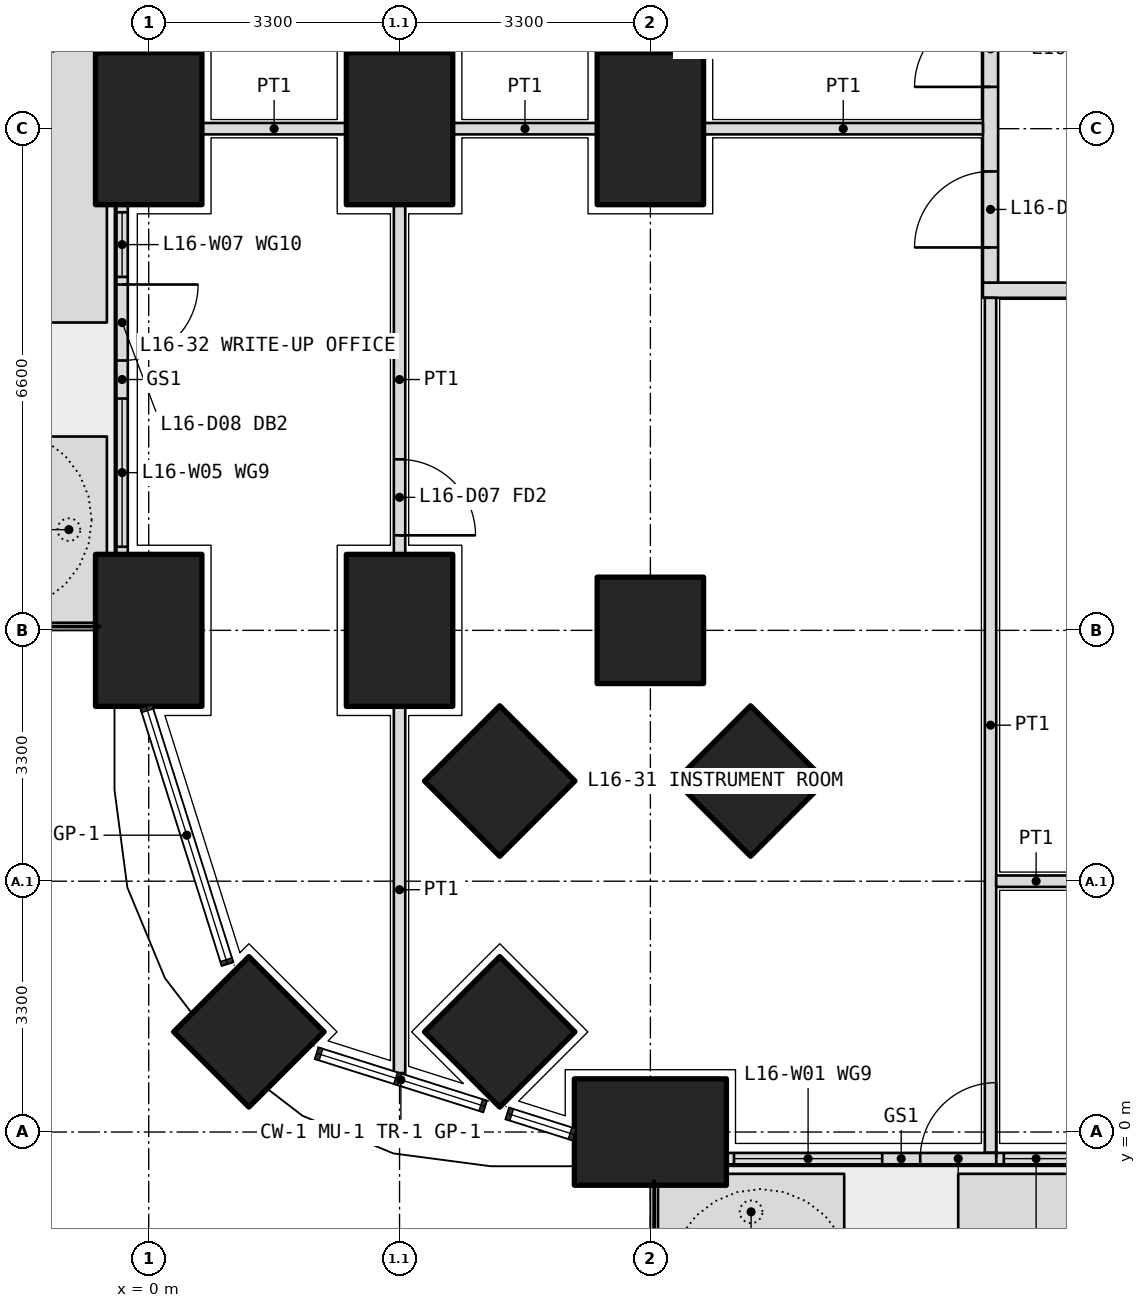
"""IFC4 building model, lengths in metres.
Left out: names, types, materials, properties, quantities, classifications, styles, units other than length and angle.
Written with IfcOpenShell. Run it as: python <this file> out.ifc"""

import sys

from ifc_helpers import new_model, si_unit, direction, frame, frame_2d, origin, origin_2d, place, context, subcontext, project, spatial, polyline, rectangle, outline, extrude, element, fill, save


model = new_model("IFC4")
c1 = context("Model", 3, precision=1e-05, world=origin(), true_north=direction((0.0, 1.0)))
c2 = subcontext(c1, "Body", "Model", "MODEL_VIEW")
j1 = project(units=[si_unit("LENGTHUNIT", "METRE"), si_unit("PLANEANGLEUNIT", "RADIAN")], contexts=[c1])
p1 = place(None, origin())
s1 = spatial("IfcSite", under=j1, at=p1, CompositionType="ELEMENT")
p2 = place(p1, origin())
s2 = spatial("IfcBuilding", under=s1, at=p2, CompositionType="ELEMENT")
p3 = place(p2, frame((0.0, 0.0, 71.7)))
s3 = spatial("IfcBuildingStorey", under=s2, at=p3, CompositionType="ELEMENT", Elevation=71.7)
p4 = place(p3, frame((1.318, 1.318, 0.0), z_axis=(0.0, 0.0, 1.0), x_axis=(0.707106781187, 0.707106781187, 0.0)))
e1 = element("IfcColumn", 1, at=p4, inside=s3, PredefinedType="COLUMN", context=c2, shape_type="SweptSolid", body=[
    extrude(rectangle(XDim=1.4, YDim=1.4, at=origin_2d()), origin(), (0.0, 0.0, 1.0), 4.2),
])
for number, where, z_axis, x_axis in (
    (2, (6.6, 0.0, 0.0), (0.0, 0.0, 1.0), (1.0, 0.0, 0.0)),
    (3, (0.0, 6.6, 0.0), (0.0, 0.0, 1.0), (0.0, 1.0, 0.0)),
    (4, (0.0, 13.2, 0.0), (0.0, 0.0, 1.0), (0.0, 1.0, 0.0)),
):
    element("IfcColumn", number, at=place(p3, frame(where, z_axis=z_axis, x_axis=x_axis)), inside=s3, PredefinedType="COLUMN", context=c2, shape_type="SweptSolid", body=[
        extrude(rectangle(XDim=2.0, YDim=1.4, at=origin_2d()), origin(), (0.0, 0.0, 1.0), 4.2),
    ])
for number, where, z_axis, x_axis in (
    (5, (6.6, 6.6, 0.0), (0.0, 0.0, 1.0), (1.0, 0.0, 0.0)),
    (6, (4.618, 1.318, 0.0), (0.0, 0.0, 1.0), (0.707, 0.707, 0.0)),
):
    element("IfcColumn", number, at=place(p3, frame(where, z_axis=z_axis, x_axis=x_axis)), inside=s3, PredefinedType="COLUMN", context=c2, shape_type="SweptSolid", body=[
        extrude(rectangle(XDim=1.4, YDim=1.4, at=origin_2d()), origin(), (0.0, 0.0, 1.0), 4.2),
    ])
for number, where, z_axis, x_axis in (
    (7, (3.3, 6.6, 0.0), (0.0, 0.0, 1.0), (0.0, 1.0, 0.0)),
    (8, (3.3, 13.2, 0.0), (0.0, 0.0, 1.0), (0.0, 1.0, 0.0)),
):
    element("IfcColumn", number, at=place(p3, frame(where, z_axis=z_axis, x_axis=x_axis)), inside=s3, PredefinedType="COLUMN", context=c2, shape_type="SweptSolid", body=[
        extrude(rectangle(XDim=2.0, YDim=1.4, at=origin_2d()), origin(), (0.0, 0.0, 1.0), 4.2),
    ])
for number, where, z_axis, x_axis in (
    (9, (4.618, 4.618, 0.0), (0.0, 0.0, 1.0), (0.707, 0.707, 0.0)),
    (10, (7.918, 4.618, 0.0), (0.0, 0.0, 1.0), (0.707, 0.707, 0.0)),
):
    element("IfcColumn", number, at=place(p3, frame(where, z_axis=z_axis, x_axis=x_axis)), inside=s3, PredefinedType="COLUMN", context=c2, shape_type="SweptSolid", body=[
        extrude(rectangle(XDim=1.4, YDim=1.4, at=origin_2d()), origin(), (0.0, 0.0, 1.0), 4.2),
    ])
p5 = place(p3, frame((6.6, 13.2, 0.0), z_axis=(0.0, 0.0, 1.0), x_axis=(0.0, 1.0, 0.0)))
e11 = element("IfcColumn", 11, at=p5, inside=s3, PredefinedType="COLUMN", context=c2, shape_type="SweptSolid", body=[
    extrude(rectangle(XDim=2.0, YDim=1.4, at=origin_2d()), origin(), (0.0, 0.0, 1.0), 4.2),
])
p6 = place(p3, origin())
e12 = element("IfcWall", 12, at=p6, inside=s3, PredefinedType="USERDEFINED", context=c2, shape_type="SweptSolid", body=[
    extrude(outline(polyline([(6.7, -1.55), (9.15, -1.55), (9.15, -0.55), (6.7, -0.55), (6.7, -1.55)]), holes=[polyline([(6.85, -1.4), (9.0, -1.4), (9.0, -0.7), (6.85, -0.7), (6.85, -1.4)])]), origin(), (0.0, 0.0, 1.0), 1.05),
])
p7 = place(p3, origin())
e13 = element("IfcWall", 13, at=p7, inside=s3, PredefinedType="USERDEFINED", context=c2, shape_type="SweptSolid", body=[
    extrude(outline(polyline([(10.65, -1.55), (19.7, -1.55), (19.7, -0.55), (10.65, -0.55), (10.65, -1.55)]), holes=[polyline([(10.8, -1.4), (19.55, -1.4), (19.55, -0.7), (10.8, -0.7), (10.8, -1.4)])]), origin(), (0.0, 0.0, 1.0), 1.05),
])
p8 = place(p3, origin())
e14 = element("IfcWall", 14, at=p8, inside=s3, PredefinedType="USERDEFINED", context=c2, shape_type="SweptSolid", body=[
    extrude(outline(polyline([(-1.55, 6.7), (-0.55, 6.7), (-0.55, 9.15), (-1.55, 9.15), (-1.55, 6.7)]), holes=[polyline([(-1.4, 6.85), (-0.7, 6.85), (-0.7, 9.0), (-1.4, 9.0), (-1.4, 6.85)])]), origin(), (0.0, 0.0, 1.0), 1.05),
])
p9 = place(p3, origin())
e15 = element("IfcWall", 15, at=p9, inside=s3, PredefinedType="USERDEFINED", context=c2, shape_type="SweptSolid", body=[
    extrude(outline(polyline([(-1.55, 10.65), (-0.55, 10.65), (-0.55, 19.7), (-1.55, 19.7), (-1.55, 10.65)]), holes=[polyline([(-1.4, 10.8), (-0.7, 10.8), (-0.7, 19.55), (-1.4, 19.55), (-1.4, 10.8)])]), origin(), (0.0, 0.0, 1.0), 1.05),
])
p10 = place(p3, frame((7.6, -0.35, 0.0), z_axis=(0.0, 0.0, 1.0), x_axis=(1.0, 0.0, 0.0)))
e16 = element("IfcWall", 16, at=p10, inside=s3, PredefinedType="SOLIDWALL", context=c2, shape_type="SweptSolid", body=[
    extrude(rectangle(XDim=4.6, YDim=0.15, at=frame_2d((2.3, 0.0))), origin(), (0.0, 0.0, 1.0), 2.05),
])
p11 = place(p10, frame((2.55, 0.0, 0.0)))
e17 = element("IfcOpeningElement", 17, at=p11, cuts=e16, PredefinedType="OPENING", context=c2, shape_type="SweptSolid", body=[
    extrude(rectangle(XDim=1.0, YDim=2.0, at=frame_2d((0.5, 1.0))), frame((0.0, 0.085, 0.0), z_axis=(0.0, -1.0, 0.0), x_axis=(1.0, 0.0, 0.0)), (0.0, 0.0, 1.0), 0.17),
])
p12 = place(p10, frame((0.1, 0.0, 0.1)))
e18 = element("IfcOpeningElement", 18, at=p12, cuts=e16, PredefinedType="OPENING", context=c2, shape_type="SweptSolid", body=[
    extrude(rectangle(XDim=1.95, YDim=1.65, at=frame_2d((0.975, 0.825))), frame((0.0, 0.085, 0.0), z_axis=(0.0, -1.0, 0.0), x_axis=(1.0, 0.0, 0.0)), (0.0, 0.0, 1.0), 0.17),
])
p13 = place(p10, frame((3.65, 0.0, 0.1)))
e19 = element("IfcOpeningElement", 19, at=p13, cuts=e16, PredefinedType="OPENING", context=c2, shape_type="SweptSolid", body=[
    extrude(rectangle(XDim=0.85, YDim=1.65, at=frame_2d((0.425, 0.825))), frame((0.0, 0.085, 0.0), z_axis=(0.0, -1.0, 0.0), x_axis=(1.0, 0.0, 0.0)), (0.0, 0.0, 1.0), 0.17),
])
p14 = place(p3, frame((-0.35, 12.2, 0.0), z_axis=(0.0, 0.0, 1.0), x_axis=(0.0, -1.0, 0.0)))
e20 = element("IfcWall", 20, at=p14, inside=s3, PredefinedType="SOLIDWALL", context=c2, shape_type="SweptSolid", body=[
    extrude(rectangle(XDim=4.6, YDim=0.15, at=frame_2d((2.3, 0.0))), origin(), (0.0, 0.0, 1.0), 2.05),
])
p15 = place(p14, frame((1.05, 0.0, 0.0)))
e21 = element("IfcOpeningElement", 21, at=p15, cuts=e20, PredefinedType="OPENING", context=c2, shape_type="SweptSolid", body=[
    extrude(rectangle(XDim=1.0, YDim=2.0, at=frame_2d((0.5, 1.0))), frame((0.0, 0.085, 0.0), z_axis=(0.0, -1.0, 0.0), x_axis=(1.0, 0.0, 0.0)), (0.0, 0.0, 1.0), 0.17),
])
p16 = place(p14, frame((0.1, 0.0, 0.1)))
e22 = element("IfcOpeningElement", 22, at=p16, cuts=e20, PredefinedType="OPENING", context=c2, shape_type="SweptSolid", body=[
    extrude(rectangle(XDim=0.85, YDim=1.65, at=frame_2d((0.425, 0.825))), frame((0.0, 0.085, 0.0), z_axis=(0.0, -1.0, 0.0), x_axis=(1.0, 0.0, 0.0)), (0.0, 0.0, 1.0), 0.17),
])
p17 = place(p14, frame((2.55, 0.0, 0.1)))
e23 = element("IfcOpeningElement", 23, at=p17, cuts=e20, PredefinedType="OPENING", context=c2, shape_type="SweptSolid", body=[
    extrude(rectangle(XDim=1.95, YDim=1.65, at=frame_2d((0.975, 0.825))), frame((0.0, 0.085, 0.0), z_axis=(0.0, -1.0, 0.0), x_axis=(1.0, 0.0, 0.0)), (0.0, 0.0, 1.0), 0.17),
])
p18 = place(p3, frame((10.975, 11.075, 0.0), z_axis=(0.0, 0.0, 1.0), x_axis=(1.0, 0.0, 0.0)))
e24 = element("IfcWall", 24, at=p18, inside=s3, PredefinedType="PARTITIONING", context=c2, shape_type="SweptSolid", body=[
    extrude(rectangle(XDim=30.85, YDim=0.2, at=frame_2d((15.425, 0.0))), origin(), (0.0, 0.0, 1.0), 2.55),
])
p19 = place(p18, frame((2.312, 0.0, 0.0)))
e25 = element("IfcOpeningElement", 25, at=p19, cuts=e24, PredefinedType="OPENING", context=c2, shape_type="SweptSolid", body=[
    extrude(rectangle(XDim=1.0, YDim=2.1, at=frame_2d((0.5, 1.05))), frame((0.0, 0.11, 0.0), z_axis=(0.0, -1.0, 0.0), x_axis=(1.0, 0.0, 0.0)), (0.0, 0.0, 1.0), 0.22),
])
p20 = place(p18, frame((11.625, 0.0, 0.0)))
e26 = element("IfcOpeningElement", 26, at=p20, cuts=e24, PredefinedType="OPENING", context=c2, shape_type="SweptSolid", body=[
    extrude(rectangle(XDim=1.0, YDim=2.1, at=frame_2d((0.5, 1.05))), frame((0.0, 0.11, 0.0), z_axis=(0.0, -1.0, 0.0), x_axis=(1.0, 0.0, 0.0)), (0.0, 0.0, 1.0), 0.22),
])
p21 = place(p18, frame((23.075, 0.0, 0.0)))
e27 = element("IfcOpeningElement", 27, at=p21, cuts=e24, PredefinedType="OPENING", context=c2, shape_type="SweptSolid", body=[
    extrude(rectangle(XDim=1.2, YDim=2.1, at=frame_2d((0.6, 1.05))), frame((0.0, 0.11, 0.0), z_axis=(0.0, -1.0, 0.0), x_axis=(1.0, 0.0, 0.0)), (0.0, 0.0, 1.0), 0.22),
])
p22 = place(p18, frame((29.188, 0.0, 0.0)))
e28 = element("IfcOpeningElement", 28, at=p22, cuts=e24, PredefinedType="OPENING", context=c2, shape_type="SweptSolid", body=[
    extrude(rectangle(XDim=1.0, YDim=2.1, at=frame_2d((0.5, 1.05))), frame((0.0, 0.11, 0.0), z_axis=(0.0, -1.0, 0.0), x_axis=(1.0, 0.0, 0.0)), (0.0, 0.0, 1.0), 0.22),
])
p23 = place(p3, frame((11.075, 11.175, 0.0), z_axis=(0.0, 0.0, 1.0), x_axis=(0.0, 1.0, 0.0)))
e29 = element("IfcWall", 29, at=p23, inside=s3, PredefinedType="PARTITIONING", context=c2, shape_type="SweptSolid", body=[
    extrude(rectangle(XDim=23.85, YDim=0.2, at=frame_2d((11.925, 0.0))), origin(), (0.0, 0.0, 1.0), 2.55),
])
p24 = place(p23, frame((0.462, 0.0, 0.0)))
e30 = element("IfcOpeningElement", 30, at=p24, cuts=e29, PredefinedType="OPENING", context=c2, shape_type="SweptSolid", body=[
    extrude(rectangle(XDim=1.0, YDim=2.1, at=frame_2d((0.5, 1.05))), frame((0.0, 0.11, 0.0), z_axis=(0.0, -1.0, 0.0), x_axis=(1.0, 0.0, 0.0)), (0.0, 0.0, 1.0), 0.22),
])
p25 = place(p23, frame((2.575, 0.0, 0.0)))
e31 = element("IfcOpeningElement", 31, at=p25, cuts=e29, PredefinedType="OPENING", context=c2, shape_type="SweptSolid", body=[
    extrude(rectangle(XDim=1.0, YDim=2.1, at=frame_2d((0.5, 1.05))), frame((0.0, 0.11, 0.0), z_axis=(0.0, -1.0, 0.0), x_axis=(1.0, 0.0, 0.0)), (0.0, 0.0, 1.0), 0.22),
])
p26 = place(p23, frame((5.625, 0.0, 0.0)))
e32 = element("IfcOpeningElement", 32, at=p26, cuts=e29, PredefinedType="OPENING", context=c2, shape_type="SweptSolid", body=[
    extrude(rectangle(XDim=0.9, YDim=2.1, at=frame_2d((0.45, 1.05))), frame((0.0, 0.11, 0.0), z_axis=(0.0, -1.0, 0.0), x_axis=(1.0, 0.0, 0.0)), (0.0, 0.0, 1.0), 0.22),
])
p27 = place(p23, frame((9.425, 0.0, 0.0)))
e33 = element("IfcOpeningElement", 33, at=p27, cuts=e29, PredefinedType="OPENING", context=c2, shape_type="SweptSolid", body=[
    extrude(rectangle(XDim=0.9, YDim=2.1, at=frame_2d((0.45, 1.05))), frame((0.0, 0.11, 0.0), z_axis=(0.0, -1.0, 0.0), x_axis=(1.0, 0.0, 0.0)), (0.0, 0.0, 1.0), 0.22),
])
p28 = place(p23, frame((12.975, 0.0, 0.0)))
e34 = element("IfcOpeningElement", 34, at=p28, cuts=e29, PredefinedType="OPENING", context=c2, shape_type="SweptSolid", body=[
    extrude(rectangle(XDim=1.0, YDim=2.1, at=frame_2d((0.5, 1.05))), frame((0.0, 0.11, 0.0), z_axis=(0.0, -1.0, 0.0), x_axis=(1.0, 0.0, 0.0)), (0.0, 0.0, 1.0), 0.22),
])
p29 = place(p23, frame((18.025, 0.0, 0.0)))
e35 = element("IfcOpeningElement", 35, at=p29, cuts=e29, PredefinedType="OPENING", context=c2, shape_type="SweptSolid", body=[
    extrude(rectangle(XDim=1.0, YDim=2.1, at=frame_2d((0.5, 1.05))), frame((0.0, 0.11, 0.0), z_axis=(0.0, -1.0, 0.0), x_axis=(1.0, 0.0, 0.0)), (0.0, 0.0, 1.0), 0.22),
])
p30 = place(p23, frame((22.387, 0.0, 0.0)))
e36 = element("IfcOpeningElement", 36, at=p30, cuts=e29, PredefinedType="OPENING", context=c2, shape_type="SweptSolid", body=[
    extrude(rectangle(XDim=1.0, YDim=2.1, at=frame_2d((0.5, 1.05))), frame((0.0, 0.11, 0.0), z_axis=(0.0, -1.0, 0.0), x_axis=(1.0, 0.0, 0.0)), (0.0, 0.0, 1.0), 0.22),
])
p31 = place(p3, frame((11.075, -0.27, 0.0), z_axis=(0.0, 0.0, 1.0), x_axis=(0.0, 1.0, 0.0)))
e37 = element("IfcWall", 37, at=p31, inside=s3, PredefinedType="PARTITIONING", context=c2, shape_type="SweptSolid", body=[
    extrude(rectangle(XDim=11.245, YDim=0.15, at=frame_2d((5.623, 0.0))), origin(), (0.0, 0.0, 1.0), 3.85),
])
p32 = place(p3, frame((11.15, 3.3, 0.0), z_axis=(0.0, 0.0, 1.0), x_axis=(1.0, 0.0, 0.0)))
e38 = element("IfcWall", 38, at=p32, inside=s3, PredefinedType="PARTITIONING", context=c2, shape_type="SweptSolid", body=[
    extrude(rectangle(XDim=1.05, YDim=0.15, at=frame_2d((0.525, 0.0))), origin(), (0.0, 0.0, 1.0), 2.55),
])
p33 = place(p3, frame((3.3, 12.2, 0.0), z_axis=(0.0, 0.0, 1.0), x_axis=(0.0, -1.0, 0.0)))
e39 = element("IfcWall", 39, at=p33, inside=s3, PredefinedType="PARTITIONING", context=c2, shape_type="SweptSolid", body=[
    extrude(rectangle(XDim=4.6, YDim=0.15, at=frame_2d((2.3, 0.0))), origin(), (0.0, 0.0, 1.0), 2.55),
])
p34 = place(p33, frame((3.35, 0.0, 0.0)))
e40 = element("IfcOpeningElement", 40, at=p34, cuts=e39, PredefinedType="OPENING", context=c2, shape_type="SweptSolid", body=[
    extrude(rectangle(XDim=1.0, YDim=2.1, at=frame_2d((0.5, 1.05))), frame((0.0, 0.085, 0.0), z_axis=(0.0, -1.0, 0.0), x_axis=(1.0, 0.0, 0.0)), (0.0, 0.0, 1.0), 0.17),
])
p35 = place(p3, frame((3.3, 5.6, 0.0), z_axis=(0.0, 0.0, 1.0), x_axis=(0.0, -1.0, 0.0)))
e41 = element("IfcWall", 41, at=p35, inside=s3, PredefinedType="PARTITIONING", context=c2, shape_type="SweptSolid", body=[
    extrude(rectangle(XDim=4.824, YDim=0.15, at=frame_2d((2.412, 0.0))), origin(), (0.0, 0.0, 1.0), 3.85),
])
p36 = place(p3, frame((0.7, 13.2, 0.0), z_axis=(0.0, 0.0, 1.0), x_axis=(1.0, 0.0, 0.0)))
e42 = element("IfcWall", 42, at=p36, inside=s3, PredefinedType="PARTITIONING", context=c2, shape_type="SweptSolid", body=[
    extrude(rectangle(XDim=1.9, YDim=0.15, at=frame_2d((0.95, 0.0))), origin(), (0.0, 0.0, 1.0), 2.55),
])
p37 = place(p3, frame((4.0, 13.2, 0.0), z_axis=(0.0, 0.0, 1.0), x_axis=(1.0, 0.0, 0.0)))
e43 = element("IfcWall", 43, at=p37, inside=s3, PredefinedType="PARTITIONING", context=c2, shape_type="SweptSolid", body=[
    extrude(rectangle(XDim=1.9, YDim=0.15, at=frame_2d((0.95, 0.0))), origin(), (0.0, 0.0, 1.0), 2.55),
])
p38 = place(p3, frame((7.3, 13.2, 0.0), z_axis=(0.0, 0.0, 1.0), x_axis=(1.0, 0.0, 0.0)))
e44 = element("IfcWall", 44, at=p38, inside=s3, PredefinedType="PARTITIONING", context=c2, shape_type="SweptSolid", body=[
    extrude(rectangle(XDim=3.675, YDim=0.15, at=frame_2d((1.837, 0.0))), origin(), (0.0, 0.0, 1.0), 2.55),
])
p39 = place(p11, origin())
e45 = element("IfcDoor", 45, at=p39, inside=s3, OperationType="SINGLE_SWING_RIGHT", PredefinedType="DOOR", context=c2, shape_type="SweptSolid", body=[
    extrude(rectangle(XDim=1.0, YDim=2.0, at=frame_2d((0.5, 1.0))), frame((0.0, 0.025, 0.0), z_axis=(0.0, -1.0, 0.0), x_axis=(1.0, 0.0, 0.0)), (0.0, 0.0, 1.0), 0.05),
])
fill(e17, e45)
p40 = place(p12, origin())
e46 = element("IfcWindow", 46, at=p40, inside=s3, PartitioningType="SINGLE_PANEL", PredefinedType="WINDOW", context=c2, shape_type="SweptSolid", body=[
    extrude(rectangle(XDim=1.95, YDim=1.65, at=frame_2d((0.975, 0.825))), frame((0.0, 0.03, 0.0), z_axis=(0.0, -1.0, 0.0), x_axis=(1.0, 0.0, 0.0)), (0.0, 0.0, 1.0), 0.06),
])
fill(e18, e46)
p41 = place(p13, origin())
e47 = element("IfcWindow", 47, at=p41, inside=s3, PartitioningType="SINGLE_PANEL", PredefinedType="WINDOW", context=c2, shape_type="SweptSolid", body=[
    extrude(rectangle(XDim=0.85, YDim=1.65, at=frame_2d((0.425, 0.825))), frame((0.0, 0.03, 0.0), z_axis=(0.0, -1.0, 0.0), x_axis=(1.0, 0.0, 0.0)), (0.0, 0.0, 1.0), 0.06),
])
fill(e19, e47)
p42 = place(p15, origin())
e48 = element("IfcDoor", 48, at=p42, inside=s3, OperationType="SINGLE_SWING_LEFT", PredefinedType="DOOR", context=c2, shape_type="SweptSolid", body=[
    extrude(rectangle(XDim=1.0, YDim=2.0, at=frame_2d((0.5, 1.0))), frame((0.0, 0.025, 0.0), z_axis=(0.0, -1.0, 0.0), x_axis=(1.0, 0.0, 0.0)), (0.0, 0.0, 1.0), 0.05),
])
fill(e21, e48)
p43 = place(p16, origin())
e49 = element("IfcWindow", 49, at=p43, inside=s3, PartitioningType="SINGLE_PANEL", PredefinedType="WINDOW", context=c2, shape_type="SweptSolid", body=[
    extrude(rectangle(XDim=0.85, YDim=1.65, at=frame_2d((0.425, 0.825))), frame((0.0, 0.03, 0.0), z_axis=(0.0, -1.0, 0.0), x_axis=(1.0, 0.0, 0.0)), (0.0, 0.0, 1.0), 0.06),
])
fill(e22, e49)
p44 = place(p17, origin())
e50 = element("IfcWindow", 50, at=p44, inside=s3, PartitioningType="SINGLE_PANEL", PredefinedType="WINDOW", context=c2, shape_type="SweptSolid", body=[
    extrude(rectangle(XDim=1.95, YDim=1.65, at=frame_2d((0.975, 0.825))), frame((0.0, 0.03, 0.0), z_axis=(0.0, -1.0, 0.0), x_axis=(1.0, 0.0, 0.0)), (0.0, 0.0, 1.0), 0.06),
])
fill(e23, e50)
p45 = place(p24, origin())
e51 = element("IfcDoor", 51, at=p45, inside=s3, OperationType="SINGLE_SWING_LEFT", PredefinedType="DOOR", context=c2, shape_type="SweptSolid", body=[
    extrude(rectangle(XDim=1.0, YDim=2.1, at=frame_2d((0.5, 1.05))), frame((0.0, 0.025, 0.0), z_axis=(0.0, -1.0, 0.0), x_axis=(1.0, 0.0, 0.0)), (0.0, 0.0, 1.0), 0.05),
])
fill(e30, e51)
p46 = place(p34, origin())
e52 = element("IfcDoor", 52, at=p46, inside=s3, OperationType="SINGLE_SWING_RIGHT", PredefinedType="DOOR", context=c2, shape_type="SweptSolid", body=[
    extrude(rectangle(XDim=1.0, YDim=2.1, at=frame_2d((0.5, 1.05))), frame((0.0, 0.025, 0.0), z_axis=(0.0, -1.0, 0.0), x_axis=(1.0, 0.0, 0.0)), (0.0, 0.0, 1.0), 0.05),
])
fill(e40, e52)
p47 = place(p25, origin())
e53 = element("IfcDoor", 53, at=p47, inside=s3, OperationType="SINGLE_SWING_LEFT", PredefinedType="DOOR", context=c2, shape_type="SweptSolid", body=[
    extrude(rectangle(XDim=1.0, YDim=2.1, at=frame_2d((0.5, 1.05))), frame((0.0, 0.025, 0.0), z_axis=(0.0, -1.0, 0.0), x_axis=(1.0, 0.0, 0.0)), (0.0, 0.0, 1.0), 0.05),
])
fill(e31, e53)
save(model, sys.argv[1])
